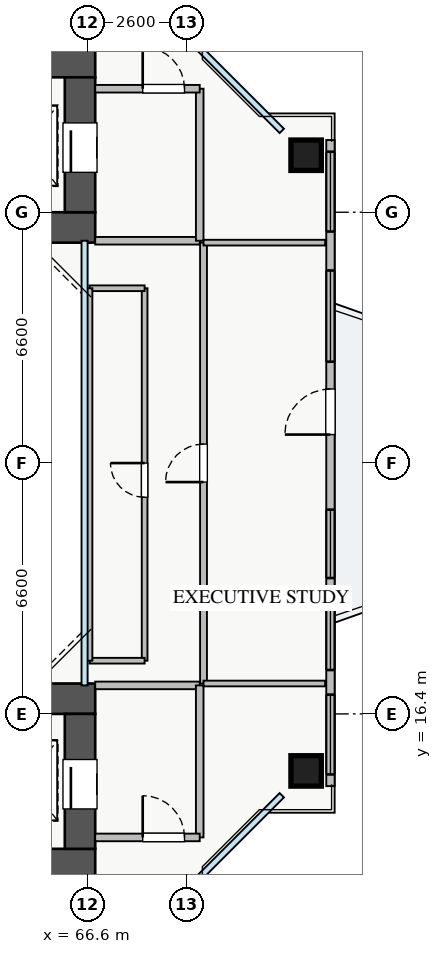
"""IFC4 building model, lengths in metres.
Left out: names, types, materials, properties, quantities, classifications, styles, units other than length and angle.
Written with IfcOpenShell. Run it as: python <this file> out.ifc"""

import sys

from ifc_helpers import new_model, si_unit, direction, frame, frame_2d, origin, origin_2d, place, context, subcontext, project, spatial, rectangle, extrude, source, transform, mapped, element, fill, save


model = new_model("IFC4")
c1 = context("Model", 3, precision=1e-05, world=origin(), true_north=direction((0.0, 1.0)))
c2 = subcontext(c1, "Body", "Model", "MODEL_VIEW")
j1 = project(units=[si_unit("LENGTHUNIT", "METRE"), si_unit("PLANEANGLEUNIT", "RADIAN")], contexts=[c1])
p1 = place(None, origin())
s1 = spatial("IfcSite", under=j1, at=p1, CompositionType="ELEMENT")
p2 = place(p1, origin())
s2 = spatial("IfcBuilding", under=s1, at=p2, CompositionType="ELEMENT")
p3 = place(p2, frame((0.0, 0.0, 82.75)))
s3 = spatial("IfcBuildingStorey", under=s2, at=p3, CompositionType="ELEMENT", Elevation=82.75)
p4 = place(p3, frame((54.2, 29.2, 0.0), z_axis=(0.0, 0.0, 1.0), x_axis=(1.0, 0.0, 0.0)))
e1 = element("IfcWall", 1, at=p4, inside=s3, PredefinedType="SHEAR", context=c2, shape_type="SweptSolid", body=[
    extrude(rectangle(XDim=12.6, YDim=0.8, at=frame_2d((6.3, 0.0))), origin(), (0.0, 0.0, 1.0), 3.25),
])
p5 = place(p3, frame((54.2, 33.55, 0.0), z_axis=(0.0, 0.0, 1.0), x_axis=(1.0, 0.0, 0.0)))
e2 = element("IfcWall", 2, at=p5, inside=s3, PredefinedType="SHEAR", context=c2, shape_type="SweptSolid", body=[
    extrude(rectangle(XDim=12.6, YDim=0.8, at=frame_2d((6.3, 0.0))), origin(), (0.0, 0.0, 1.0), 3.25),
])
p6 = place(p5, frame((8.2, 0.0, 0.0)))
e3 = element("IfcOpeningElement", 3, at=p6, cuts=e2, PredefinedType="OPENING", context=c2, shape_type="SweptSolid", body=[
    extrude(rectangle(XDim=1.1, YDim=2.05, at=frame_2d((0.55, 1.025))), frame((0.0, 0.41, 0.0), z_axis=(0.0, -1.0, 0.0), x_axis=(1.0, 0.0, 0.0)), (0.0, 0.0, 1.0), 0.82),
])
p7 = place(p3, frame((66.4, 29.6, 0.0), z_axis=(0.0, 0.0, 1.0), x_axis=(0.0, 1.0, 0.0)))
e4 = element("IfcWall", 4, at=p7, inside=s3, PredefinedType="SHEAR", context=c2, shape_type="SweptSolid", body=[
    extrude(rectangle(XDim=3.55, YDim=0.8, at=frame_2d((1.775, 0.0))), origin(), (0.0, 0.0, 1.0), 3.25),
])
p8 = place(p7, frame((1.05, 0.0, 0.0)))
e5 = element("IfcOpeningElement", 5, at=p8, cuts=e4, PredefinedType="OPENING", context=c2, shape_type="SweptSolid", body=[
    extrude(rectangle(XDim=1.3, YDim=2.05, at=frame_2d((0.65, 1.025))), frame((0.0, 0.41, 0.0), z_axis=(0.0, -1.0, 0.0), x_axis=(1.0, 0.0, 0.0)), (0.0, 0.0, 1.0), 0.82),
])
p9 = place(p3, frame((54.2, 12.45, 0.0), z_axis=(0.0, 0.0, 1.0), x_axis=(1.0, 0.0, 0.0)))
e6 = element("IfcWall", 6, at=p9, inside=s3, PredefinedType="SHEAR", context=c2, shape_type="SweptSolid", body=[
    extrude(rectangle(XDim=12.6, YDim=0.8, at=frame_2d((6.3, 0.0))), origin(), (0.0, 0.0, 1.0), 3.25),
])
p10 = place(p9, frame((8.2, 0.0, 0.0)))
e7 = element("IfcOpeningElement", 7, at=p10, cuts=e6, PredefinedType="OPENING", context=c2, shape_type="SweptSolid", body=[
    extrude(rectangle(XDim=1.1, YDim=2.05, at=frame_2d((0.55, 1.025))), frame((0.0, 0.41, 0.0), z_axis=(0.0, -1.0, 0.0), x_axis=(1.0, 0.0, 0.0)), (0.0, 0.0, 1.0), 0.82),
])
p11 = place(p3, frame((54.2, 16.8, 0.0), z_axis=(0.0, 0.0, 1.0), x_axis=(1.0, 0.0, 0.0)))
e8 = element("IfcWall", 8, at=p11, inside=s3, PredefinedType="SHEAR", context=c2, shape_type="SweptSolid", body=[
    extrude(rectangle(XDim=12.6, YDim=0.8, at=frame_2d((6.3, 0.0))), origin(), (0.0, 0.0, 1.0), 3.25),
])
p12 = place(p3, frame((66.4, 12.85, 0.0), z_axis=(0.0, 0.0, 1.0), x_axis=(0.0, 1.0, 0.0)))
e9 = element("IfcWall", 9, at=p12, inside=s3, PredefinedType="SHEAR", context=c2, shape_type="SweptSolid", body=[
    extrude(rectangle(XDim=3.55, YDim=0.8, at=frame_2d((1.775, 0.0))), origin(), (0.0, 0.0, 1.0), 3.25),
])
p13 = place(p12, frame((1.05, 0.0, 0.0)))
e10 = element("IfcOpeningElement", 10, at=p13, cuts=e9, PredefinedType="OPENING", context=c2, shape_type="SweptSolid", body=[
    extrude(rectangle(XDim=1.3, YDim=2.05, at=frame_2d((0.65, 1.025))), frame((0.0, 0.41, 0.0), z_axis=(0.0, -1.0, 0.0), x_axis=(1.0, 0.0, 0.0)), (0.0, 0.0, 1.0), 0.82),
])
m1 = source(origin(), c2, "Body", "SweptSolid", [
    extrude(rectangle(XDim=0.8, YDim=0.8, at=origin_2d()), origin(), (0.0, 0.0, 1.0), 3.25),
])
for number, where, z_axis, x_axis in (
    (11, (72.35, 14.9, 0.0), (0.0, 0.0, 1.0), (1.0, 0.0, 0.0)),
    (12, (72.35, 31.1, 0.0), (0.0, 0.0, 1.0), (1.0, 0.0, 0.0)),
):
    element("IfcColumn", number, at=place(p3, frame(where, z_axis=z_axis, x_axis=x_axis)), inside=s3, PredefinedType="COLUMN", context=c2, shape_type="MappedRepresentation", body=[
        mapped(m1, transform((0.0, 0.0, 0.0), x_axis=(1.0, 0.0, 0.0), y_axis=(0.0, 1.0, 0.0), z_axis=(0.0, 0.0, 1.0), scale=1.0)),
    ])
p14 = place(p3, frame((72.99, 14.5, 0.0), z_axis=(0.0, 0.0, 1.0), x_axis=(0.0, 1.0, 0.0)))
e13 = element("IfcWall", 13, at=p14, inside=s3, PredefinedType="STANDARD", context=c2, shape_type="SweptSolid", body=[
    extrude(rectangle(XDim=17.0, YDim=0.22, at=frame_2d((8.5, 0.0))), origin(), (0.0, 0.0, 1.0), 2.61),
])
p15 = place(p14, frame((9.25, 0.0, 0.0)))
e14 = element("IfcOpeningElement", 14, at=p15, cuts=e13, PredefinedType="OPENING", context=c2, shape_type="SweptSolid", body=[
    extrude(rectangle(XDim=1.2, YDim=2.1, at=frame_2d((0.6, 1.05))), frame((0.0, 0.12, 0.0), z_axis=(0.0, -1.0, 0.0), x_axis=(1.0, 0.0, 0.0)), (0.0, 0.0, 1.0), 0.24),
])
p16 = place(p14, frame((0.308, 0.0, 0.9)))
e15 = element("IfcOpeningElement", 15, at=p16, cuts=e13, PredefinedType="OPENING", context=c2, shape_type="SweptSolid", body=[
    extrude(rectangle(XDim=2.1, YDim=1.5, at=frame_2d((1.05, 0.75))), frame((0.0, 0.12, 0.0), z_axis=(0.0, -1.0, 0.0), x_axis=(1.0, 0.0, 0.0)), (0.0, 0.0, 1.0), 0.24),
])
p17 = place(p14, frame((5.475, 0.0, 0.9)))
e16 = element("IfcOpeningElement", 16, at=p17, cuts=e13, PredefinedType="OPENING", context=c2, shape_type="SweptSolid", body=[
    extrude(rectangle(XDim=1.8, YDim=1.45, at=frame_2d((0.9, 0.725))), frame((0.0, 0.12, 0.0), z_axis=(0.0, -1.0, 0.0), x_axis=(1.0, 0.0, 0.0)), (0.0, 0.0, 1.0), 0.24),
])
p18 = place(p14, frame((14.593, 0.0, 0.9)))
e17 = element("IfcOpeningElement", 17, at=p18, cuts=e13, PredefinedType="OPENING", context=c2, shape_type="SweptSolid", body=[
    extrude(rectangle(XDim=2.1, YDim=1.5, at=frame_2d((1.05, 0.75))), frame((0.0, 0.12, 0.0), z_axis=(0.0, -1.0, 0.0), x_axis=(1.0, 0.0, 0.0)), (0.0, 0.0, 1.0), 0.24),
])
p19 = place(p14, frame((3.055, 0.0, 0.9)))
e18 = element("IfcOpeningElement", 18, at=p19, cuts=e13, PredefinedType="OPENING", context=c2, shape_type="SweptSolid", body=[
    extrude(rectangle(XDim=2.1, YDim=1.5, at=frame_2d((1.05, 0.75))), frame((0.0, 0.12, 0.0), z_axis=(0.0, -1.0, 0.0), x_axis=(1.0, 0.0, 0.0)), (0.0, 0.0, 1.0), 0.24),
])
p20 = place(p14, frame((11.167, 0.0, 0.9)))
e19 = element("IfcOpeningElement", 19, at=p20, cuts=e13, PredefinedType="OPENING", context=c2, shape_type="SweptSolid", body=[
    extrude(rectangle(XDim=2.4, YDim=1.5, at=frame_2d((1.2, 0.75))), frame((0.0, 0.12, 0.0), z_axis=(0.0, -1.0, 0.0), x_axis=(1.0, 0.0, 0.0)), (0.0, 0.0, 1.0), 0.24),
])
p21 = place(p3, frame((66.8, 28.85, 0.0), z_axis=(0.0, 0.0, 1.0), x_axis=(1.0, 0.0, 0.0)))
e20 = element("IfcWall", 20, at=p21, inside=s3, PredefinedType="PARTITIONING", context=c2, shape_type="SweptSolid", body=[
    extrude(rectangle(XDim=2.75, YDim=0.2, at=frame_2d((1.375, 0.0))), origin(), (0.0, 0.0, 1.0), 3.07),
])
p22 = place(p3, frame((69.55, 28.85, 0.0), z_axis=(0.0, 0.0, 1.0), x_axis=(0.0, 1.0, 0.0)))
e21 = element("IfcWall", 21, at=p22, inside=s3, PredefinedType="PARTITIONING", context=c2, shape_type="SweptSolid", body=[
    extrude(rectangle(XDim=4.0, YDim=0.2, at=frame_2d((2.0, 0.0))), origin(), (0.0, 0.0, 1.0), 3.07),
])
p23 = place(p3, frame((66.8, 32.85, 0.0), z_axis=(0.0, 0.0, 1.0), x_axis=(1.0, 0.0, 0.0)))
e22 = element("IfcWall", 22, at=p23, inside=s3, PredefinedType="PARTITIONING", context=c2, shape_type="SweptSolid", body=[
    extrude(rectangle(XDim=2.75, YDim=0.2, at=frame_2d((1.375, 0.0))), origin(), (0.0, 0.0, 1.0), 3.07),
])
p24 = place(p23, frame((1.25, 0.0, 0.0)))
e23 = element("IfcOpeningElement", 23, at=p24, cuts=e22, PredefinedType="OPENING", context=c2, shape_type="SweptSolid", body=[
    extrude(rectangle(XDim=1.1, YDim=2.05, at=frame_2d((0.55, 1.025))), frame((0.0, 0.11, 0.0), z_axis=(0.0, -1.0, 0.0), x_axis=(1.0, 0.0, 0.0)), (0.0, 0.0, 1.0), 0.22),
])
p25 = place(p3, frame((66.8, 17.15, 0.0), z_axis=(0.0, 0.0, 1.0), x_axis=(1.0, 0.0, 0.0)))
e24 = element("IfcWall", 24, at=p25, inside=s3, PredefinedType="PARTITIONING", context=c2, shape_type="SweptSolid", body=[
    extrude(rectangle(XDim=2.75, YDim=0.2, at=frame_2d((1.375, 0.0))), origin(), (0.0, 0.0, 1.0), 3.07),
])
p26 = place(p3, frame((69.55, 13.15, 0.0), z_axis=(0.0, 0.0, 1.0), x_axis=(0.0, 1.0, 0.0)))
e25 = element("IfcWall", 25, at=p26, inside=s3, PredefinedType="PARTITIONING", context=c2, shape_type="SweptSolid", body=[
    extrude(rectangle(XDim=4.0, YDim=0.2, at=frame_2d((2.0, 0.0))), origin(), (0.0, 0.0, 1.0), 3.07),
])
p27 = place(p3, frame((66.8, 13.15, 0.0), z_axis=(0.0, 0.0, 1.0), x_axis=(1.0, 0.0, 0.0)))
e26 = element("IfcWall", 26, at=p27, inside=s3, PredefinedType="PARTITIONING", context=c2, shape_type="SweptSolid", body=[
    extrude(rectangle(XDim=2.75, YDim=0.2, at=frame_2d((1.375, 0.0))), origin(), (0.0, 0.0, 1.0), 3.07),
])
p28 = place(p27, frame((1.25, 0.0, 0.0)))
e27 = element("IfcOpeningElement", 27, at=p28, cuts=e26, PredefinedType="OPENING", context=c2, shape_type="SweptSolid", body=[
    extrude(rectangle(XDim=1.1, YDim=2.05, at=frame_2d((0.55, 1.025))), frame((0.0, 0.11, 0.0), z_axis=(0.0, -1.0, 0.0), x_axis=(1.0, 0.0, 0.0)), (0.0, 0.0, 1.0), 0.22),
])
p29 = place(p3, frame((69.65, 17.2, 0.0), z_axis=(0.0, 0.0, 1.0), x_axis=(0.0, 1.0, 0.0)))
e28 = element("IfcWall", 28, at=p29, inside=s3, PredefinedType="PARTITIONING", context=c2, shape_type="SweptSolid", body=[
    extrude(rectangle(XDim=11.6, YDim=0.18, at=frame_2d((5.8, 0.0))), origin(), (0.0, 0.0, 1.0), 3.07),
])
p30 = place(p29, frame((5.3, 0.0, 0.0)))
e29 = element("IfcOpeningElement", 29, at=p30, cuts=e28, PredefinedType="OPENING", context=c2, shape_type="SweptSolid", body=[
    extrude(rectangle(XDim=1.0, YDim=2.05, at=frame_2d((0.5, 1.025))), frame((0.0, 0.1, 0.0), z_axis=(0.0, -1.0, 0.0), x_axis=(1.0, 0.0, 0.0)), (0.0, 0.0, 1.0), 0.2),
])
for number, where, z_axis, x_axis in (
    (30, (69.65, 17.2, 0.0), (0.0, 0.0, 1.0), (1.0, 0.0, 0.0)),
    (31, (69.65, 28.8, 0.0), (0.0, 0.0, 1.0), (1.0, 0.0, 0.0)),
):
    element("IfcWall", number, at=place(p3, frame(where, z_axis=z_axis, x_axis=x_axis)), inside=s3, PredefinedType="PARTITIONING", context=c2, shape_type="SweptSolid", body=[
        extrude(rectangle(XDim=3.2, YDim=0.15, at=frame_2d((1.6, 0.0))), origin(), (0.0, 0.0, 1.0), 3.07),
    ])
p31 = place(p3, frame((68.1, 17.8, 0.0), z_axis=(0.0, 0.0, 1.0), x_axis=(0.0, 1.0, 0.0)))
e32 = element("IfcWall", 32, at=p31, inside=s3, PredefinedType="PARTITIONING", context=c2, shape_type="SweptSolid", body=[
    extrude(rectangle(XDim=9.8, YDim=0.15, at=frame_2d((4.9, 0.0))), origin(), (0.0, 0.0, 1.0), 3.07),
])
p32 = place(p31, frame((4.3, 0.0, 0.0)))
e33 = element("IfcOpeningElement", 33, at=p32, cuts=e32, PredefinedType="OPENING", context=c2, shape_type="SweptSolid", body=[
    extrude(rectangle(XDim=0.9, YDim=2.05, at=frame_2d((0.45, 1.025))), frame((0.0, 0.085, 0.0), z_axis=(0.0, -1.0, 0.0), x_axis=(1.0, 0.0, 0.0)), (0.0, 0.0, 1.0), 0.17),
])
p33 = place(p3, frame((66.65, 27.6, 0.0), z_axis=(0.0, 0.0, 1.0), x_axis=(1.0, 0.0, 0.0)))
e34 = element("IfcWall", 34, at=p33, inside=s3, PredefinedType="PARTITIONING", context=c2, shape_type="SweptSolid", body=[
    extrude(rectangle(XDim=1.45, YDim=0.15, at=frame_2d((0.725, 0.0))), origin(), (0.0, 0.0, 1.0), 2.771),
])
p34 = place(p3, frame((66.65, 17.8, 0.0), z_axis=(0.0, 0.0, 1.0), x_axis=(1.0, 0.0, 0.0)))
e35 = element("IfcWall", 35, at=p34, inside=s3, PredefinedType="PARTITIONING", context=c2, shape_type="SweptSolid", body=[
    extrude(rectangle(XDim=1.45, YDim=0.15, at=frame_2d((0.725, 0.0))), origin(), (0.0, 0.0, 1.0), 3.07),
])
p35 = place(p3, frame((66.65, 17.8, 0.0), z_axis=(0.0, 0.0, 1.0), x_axis=(0.0, 1.0, 0.0)))
e36 = element("IfcWall", 36, at=p35, inside=s3, PredefinedType="PARTITIONING", context=c2, shape_type="SweptSolid", body=[
    extrude(rectangle(XDim=9.8, YDim=0.15, at=frame_2d((4.9, 0.0))), origin(), (0.0, 0.0, 1.0), 2.665),
])
m2 = source(origin(), c2, "Body", "SweptSolid", [
    extrude(rectangle(XDim=1.2, YDim=2.1, at=frame_2d((0.6, 1.05))), frame((0.0, 0.025, 0.0), z_axis=(0.0, -1.0, 0.0), x_axis=(1.0, 0.0, 0.0)), (0.0, 0.0, 1.0), 0.05),
])
p36 = place(p15, origin())
e37 = element("IfcDoor", 37, at=p36, inside=s3, OperationType="SINGLE_SWING_LEFT", PredefinedType="DOOR", context=c2, shape_type="MappedRepresentation", body=[
    mapped(m2, transform((0.0, 0.0, 0.0), x_axis=(1.0, 0.0, 0.0), y_axis=(0.0, 1.0, 0.0), z_axis=(0.0, 0.0, 1.0), scale=1.0)),
])
fill(e14, e37)
m3 = source(origin(), c2, "Body", "SweptSolid", [
    extrude(rectangle(XDim=2.1, YDim=1.5, at=frame_2d((1.05, 0.75))), frame((0.0, 0.03, 0.0), z_axis=(0.0, -1.0, 0.0), x_axis=(1.0, 0.0, 0.0)), (0.0, 0.0, 1.0), 0.06),
])
p37 = place(p16, origin())
e38 = element("IfcWindow", 38, at=p37, inside=s3, PartitioningType="TRIPLE_PANEL_VERTICAL", PredefinedType="WINDOW", context=c2, shape_type="MappedRepresentation", body=[
    mapped(m3, transform((0.0, 0.0, 0.0), x_axis=(1.0, 0.0, 0.0), y_axis=(0.0, 1.0, 0.0), z_axis=(0.0, 0.0, 1.0), scale=1.0)),
])
fill(e15, e38)
m4 = source(origin(), c2, "Body", "SweptSolid", [
    extrude(rectangle(XDim=1.8, YDim=1.45, at=frame_2d((0.9, 0.725))), frame((0.0, 0.03, 0.0), z_axis=(0.0, -1.0, 0.0), x_axis=(1.0, 0.0, 0.0)), (0.0, 0.0, 1.0), 0.06),
])
p38 = place(p17, origin())
e39 = element("IfcWindow", 39, at=p38, inside=s3, PartitioningType="DOUBLE_PANEL_VERTICAL", PredefinedType="WINDOW", context=c2, shape_type="MappedRepresentation", body=[
    mapped(m4, transform((0.0, 0.0, 0.0), x_axis=(1.0, 0.0, 0.0), y_axis=(0.0, 1.0, 0.0), z_axis=(0.0, 0.0, 1.0), scale=1.0)),
])
fill(e16, e39)
p39 = place(p18, origin())
e40 = element("IfcWindow", 40, at=p39, inside=s3, PartitioningType="TRIPLE_PANEL_VERTICAL", PredefinedType="WINDOW", context=c2, shape_type="MappedRepresentation", body=[
    mapped(m3, transform((0.0, 0.0, 0.0), x_axis=(1.0, 0.0, 0.0), y_axis=(0.0, 1.0, 0.0), z_axis=(0.0, 0.0, 1.0), scale=1.0)),
])
fill(e17, e40)
m5 = source(origin(), c2, "Body", "SweptSolid", [
    extrude(rectangle(XDim=1.3, YDim=2.05, at=frame_2d((0.65, 1.025))), frame((0.0, 0.025, 0.0), z_axis=(0.0, -1.0, 0.0), x_axis=(1.0, 0.0, 0.0)), (0.0, 0.0, 1.0), 0.05),
])
p40 = place(p8, origin())
e41 = element("IfcDoor", 41, at=p40, inside=s3, OperationType="SLIDING_TO_LEFT", PredefinedType="DOOR", context=c2, shape_type="MappedRepresentation", body=[
    mapped(m5, transform((0.0, 0.0, 0.0), x_axis=(1.0, 0.0, 0.0), y_axis=(0.0, 1.0, 0.0), z_axis=(0.0, 0.0, 1.0), scale=1.0)),
])
fill(e5, e41)
p41 = place(p13, origin())
e42 = element("IfcDoor", 42, at=p41, inside=s3, OperationType="SLIDING_TO_RIGHT", PredefinedType="DOOR", context=c2, shape_type="MappedRepresentation", body=[
    mapped(m5, transform((0.0, 0.0, 0.0), x_axis=(1.0, 0.0, 0.0), y_axis=(0.0, 1.0, 0.0), z_axis=(0.0, 0.0, 1.0), scale=1.0)),
])
fill(e10, e42)
m6 = source(origin(), c2, "Body", "SweptSolid", [
    extrude(rectangle(XDim=1.1, YDim=2.05, at=frame_2d((0.55, 1.025))), frame((0.0, 0.025, 0.0), z_axis=(0.0, -1.0, 0.0), x_axis=(1.0, 0.0, 0.0)), (0.0, 0.0, 1.0), 0.05),
])
p42 = place(p24, origin())
e43 = element("IfcDoor", 43, at=p42, inside=s3, OperationType="SINGLE_SWING_LEFT", PredefinedType="DOOR", context=c2, shape_type="MappedRepresentation", body=[
    mapped(m6, transform((0.0, 0.0, 0.0), x_axis=(1.0, 0.0, 0.0), y_axis=(0.0, 1.0, 0.0), z_axis=(0.0, 0.0, 1.0), scale=1.0)),
])
fill(e23, e43)
p43 = place(p28, origin())
e44 = element("IfcDoor", 44, at=p43, inside=s3, OperationType="SINGLE_SWING_LEFT", PredefinedType="DOOR", context=c2, shape_type="MappedRepresentation", body=[
    mapped(m6, transform((0.0, 0.0, 0.0), x_axis=(1.0, 0.0, 0.0), y_axis=(0.0, 1.0, 0.0), z_axis=(0.0, 0.0, 1.0), scale=1.0)),
])
fill(e27, e44)
m7 = source(origin(), c2, "Body", "SweptSolid", [
    extrude(rectangle(XDim=1.0, YDim=2.05, at=frame_2d((0.5, 1.025))), frame((0.0, 0.025, 0.0), z_axis=(0.0, -1.0, 0.0), x_axis=(1.0, 0.0, 0.0)), (0.0, 0.0, 1.0), 0.05),
])
p44 = place(p30, origin())
e45 = element("IfcDoor", 45, at=p44, inside=s3, OperationType="SINGLE_SWING_LEFT", PredefinedType="DOOR", context=c2, shape_type="MappedRepresentation", body=[
    mapped(m7, transform((0.0, 0.0, 0.0), x_axis=(1.0, 0.0, 0.0), y_axis=(0.0, 1.0, 0.0), z_axis=(0.0, 0.0, 1.0), scale=1.0)),
])
fill(e29, e45)
m8 = source(origin(), c2, "Body", "SweptSolid", [
    extrude(rectangle(XDim=0.9, YDim=2.05, at=frame_2d((0.45, 1.025))), frame((0.0, 0.025, 0.0), z_axis=(0.0, -1.0, 0.0), x_axis=(1.0, 0.0, 0.0)), (0.0, 0.0, 1.0), 0.05),
])
p45 = place(p32, origin())
e46 = element("IfcDoor", 46, at=p45, inside=s3, OperationType="SINGLE_SWING_RIGHT", PredefinedType="DOOR", context=c2, shape_type="MappedRepresentation", body=[
    mapped(m8, transform((0.0, 0.0, 0.0), x_axis=(1.0, 0.0, 0.0), y_axis=(0.0, 1.0, 0.0), z_axis=(0.0, 0.0, 1.0), scale=1.0)),
])
fill(e33, e46)
p46 = place(p19, origin())
e47 = element("IfcWindow", 47, at=p46, inside=s3, PartitioningType="TRIPLE_PANEL_VERTICAL", PredefinedType="WINDOW", context=c2, shape_type="MappedRepresentation", body=[
    mapped(m3, transform((0.0, 0.0, 0.0), x_axis=(1.0, 0.0, 0.0), y_axis=(0.0, 1.0, 0.0), z_axis=(0.0, 0.0, 1.0), scale=1.0)),
])
fill(e18, e47)
m9 = source(origin(), c2, "Body", "SweptSolid", [
    extrude(rectangle(XDim=2.4, YDim=1.5, at=frame_2d((1.2, 0.75))), frame((0.0, 0.03, 0.0), z_axis=(0.0, -1.0, 0.0), x_axis=(1.0, 0.0, 0.0)), (0.0, 0.0, 1.0), 0.06),
])
p47 = place(p20, origin())
e48 = element("IfcWindow", 48, at=p47, inside=s3, PartitioningType="TRIPLE_PANEL_VERTICAL", PredefinedType="WINDOW", context=c2, shape_type="MappedRepresentation", body=[
    mapped(m9, transform((0.0, 0.0, 0.0), x_axis=(1.0, 0.0, 0.0), y_axis=(0.0, 1.0, 0.0), z_axis=(0.0, 0.0, 1.0), scale=1.0)),
])
fill(e19, e48)
save(model, sys.argv[1])
